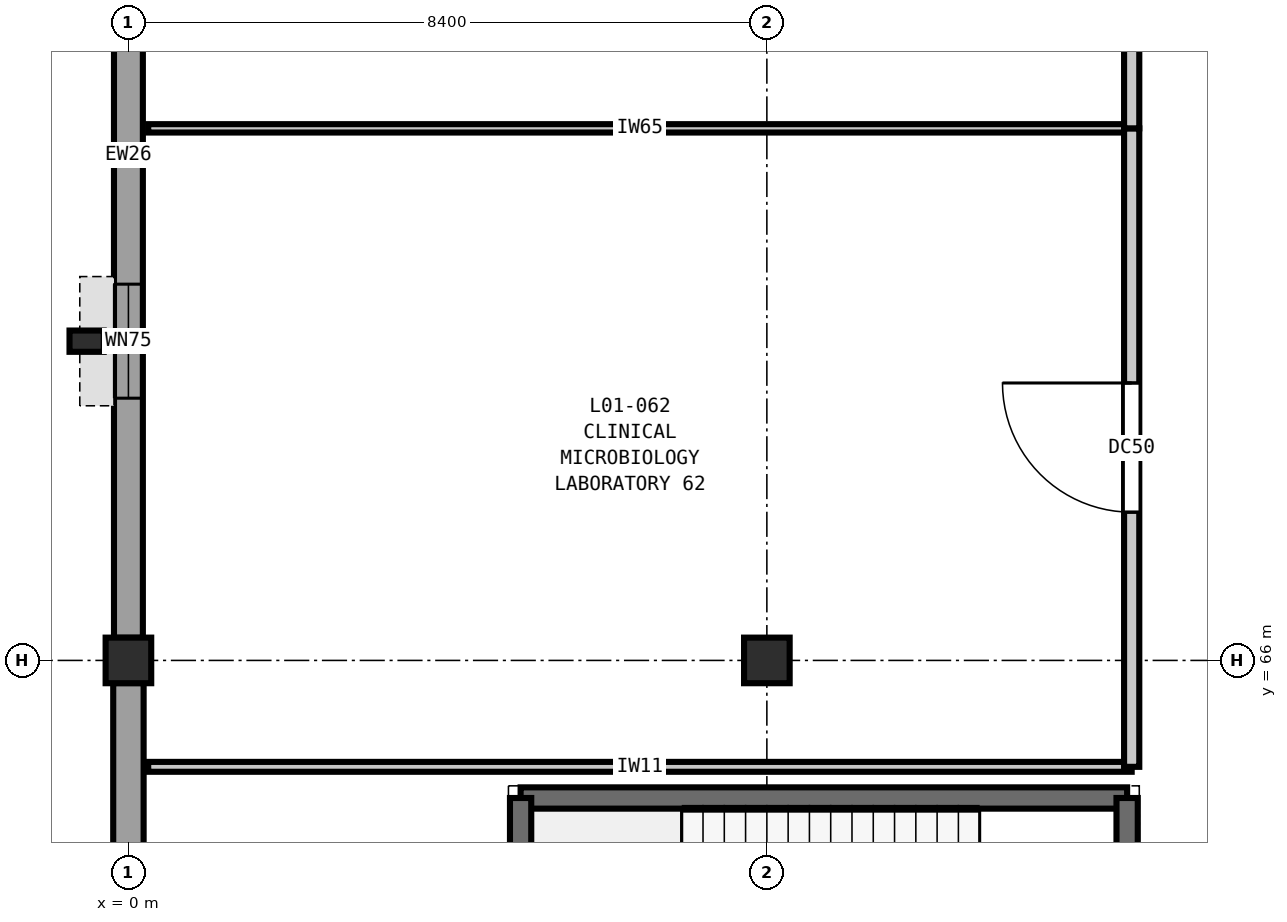
"""IFC4 building model, lengths in metres.
Left out: names, types, materials, properties, quantities, classifications, styles, units other than length and angle.
Written with IfcOpenShell. Run it as: python <this file> out.ifc"""

import sys

from ifc_helpers import new_model, si_unit, direction, frame, frame_2d, origin, origin_2d, place, context, subcontext, project, spatial, rectangle, extrude, element, fill, save


model = new_model("IFC4")
c1 = context("Model", 3, precision=1e-05, world=origin(), true_north=direction((0.0, 1.0)))
c2 = subcontext(c1, "Body", "Model", "MODEL_VIEW")
j1 = project(units=[si_unit("LENGTHUNIT", "METRE"), si_unit("PLANEANGLEUNIT", "RADIAN")], contexts=[c1])
p1 = place(None, origin())
s1 = spatial("IfcSite", under=j1, at=p1, CompositionType="ELEMENT")
p2 = place(p1, origin())
s2 = spatial("IfcBuilding", under=s1, at=p2, CompositionType="ELEMENT")
p3 = place(p2, frame((0.0, 0.0, 5.4)))
s3 = spatial("IfcBuildingStorey", under=s2, at=p3, CompositionType="ELEMENT", Elevation=5.4)
for number, where, z_axis, x_axis in (
    (1, (0.0, 66.0, 0.0), (0.0, 0.0, 1.0), (1.0, 0.0, 0.0)),
    (2, (8.4, 66.0, 0.0), (0.0, 0.0, 1.0), (1.0, 0.0, 0.0)),
):
    element("IfcColumn", number, at=place(p3, frame(where, z_axis=z_axis, x_axis=x_axis)), inside=s3, PredefinedType="COLUMN", context=c2, shape_type="SweptSolid", body=[
        extrude(rectangle(XDim=0.6, YDim=0.6, at=origin_2d()), origin(), (0.0, 0.0, 1.0), 5.4),
    ])
p4 = place(p3, frame((-0.55, 70.2, 0.0), z_axis=(0.0, 0.0, 1.0), x_axis=(1.0, 0.0, 0.0)))
e3 = element("IfcColumn", 3, at=p4, inside=s3, PredefinedType="PILASTER", context=c2, shape_type="SweptSolid", body=[
    extrude(rectangle(XDim=0.45, YDim=0.28, at=origin_2d()), origin(), (0.0, 0.0, 1.0), 5.4),
])
p5 = place(p3, frame((0.0, 57.898, 0.0), z_axis=(0.0, 0.0, 1.0), x_axis=(0.0, 1.0, 0.0)))
e4 = element("IfcWall", 4, at=p5, inside=s3, PredefinedType="SOLIDWALL", context=c2, shape_type="SweptSolid", body=[
    extrude(rectangle(XDim=7.804, YDim=0.4, at=frame_2d((3.902, 0.0))), origin(), (0.0, 0.0, 1.0), 4.68),
])
p6 = place(p5, frame((3.227, 0.0, 0.9)))
e5 = element("IfcOpeningElement", 5, at=p6, cuts=e4, PredefinedType="OPENING", context=c2, shape_type="SweptSolid", body=[
    extrude(rectangle(XDim=1.35, YDim=1.55, at=frame_2d((0.675, 0.775))), frame((0.0, 0.21, 0.0), z_axis=(0.0, -1.0, 0.0), x_axis=(1.0, 0.0, 0.0)), (0.0, 0.0, 1.0), 0.42),
])
p7 = place(p3, frame((0.0, 66.298, 0.0), z_axis=(0.0, 0.0, 1.0), x_axis=(0.0, 1.0, 0.0)))
e6 = element("IfcWall", 6, at=p7, inside=s3, PredefinedType="SOLIDWALL", context=c2, shape_type="SweptSolid", body=[
    extrude(rectangle(XDim=7.804, YDim=0.38, at=frame_2d((3.902, 0.0))), origin(), (0.0, 0.0, 1.0), 4.68),
])
p8 = place(p7, frame((3.152, 0.0, 0.9)))
e7 = element("IfcOpeningElement", 7, at=p8, cuts=e6, PredefinedType="OPENING", context=c2, shape_type="SweptSolid", body=[
    extrude(rectangle(XDim=1.5, YDim=1.55, at=frame_2d((0.75, 0.775))), frame((0.0, 0.2, 0.0), z_axis=(0.0, -1.0, 0.0), x_axis=(1.0, 0.0, 0.0)), (0.0, 0.0, 1.0), 0.4),
])
p9 = place(p3, frame((13.14, 64.19, 0.0), z_axis=(0.0, 0.0, 1.0), x_axis=(-1.0, 0.0, 0.0)))
e8 = element("IfcWall", 8, at=p9, inside=s3, PredefinedType="SHEAR", context=c2, shape_type="SweptSolid", body=[
    extrude(rectangle(XDim=7.98, YDim=0.28, at=frame_2d((3.99, 0.0))), origin(), (0.0, 0.0, 1.0), 5.4),
])
p10 = place(p3, frame((5.16, 64.19, 0.0), z_axis=(0.0, 0.0, 1.0), x_axis=(0.0, -1.0, 0.0)))
e9 = element("IfcWall", 9, at=p10, inside=s3, PredefinedType="SHEAR", context=c2, shape_type="SweptSolid", body=[
    extrude(rectangle(XDim=4.08, YDim=0.28, at=frame_2d((2.04, 0.0))), origin(), (0.0, 0.0, 1.0), 5.4),
])
p11 = place(p3, frame((13.14, 60.11, 0.0), z_axis=(0.0, 0.0, 1.0), x_axis=(0.0, 1.0, 0.0)))
e10 = element("IfcWall", 10, at=p11, inside=s3, PredefinedType="SHEAR", context=c2, shape_type="SweptSolid", body=[
    extrude(rectangle(XDim=4.08, YDim=0.28, at=frame_2d((2.04, 0.0))), origin(), (0.0, 0.0, 1.0), 5.4),
])
p12 = place(p11, frame((1.29, 0.0, 0.0)))
e11 = element("IfcOpeningElement", 11, at=p12, cuts=e10, PredefinedType="OPENING", context=c2, shape_type="SweptSolid", body=[
    extrude(rectangle(XDim=1.5, YDim=2.2, at=frame_2d((0.75, 1.1))), frame((0.0, 0.15, 0.0), z_axis=(0.0, -1.0, 0.0), x_axis=(1.0, 0.0, 0.0)), (0.0, 0.0, 1.0), 0.3),
])
p13 = place(p3, frame((0.26, 64.6, 0.0), z_axis=(0.0, 0.0, 1.0), x_axis=(1.0, 0.0, 0.0)))
e12 = element("IfcWall", 12, at=p13, inside=s3, PredefinedType="PARTITIONING", context=c2, shape_type="SweptSolid", body=[
    extrude(rectangle(XDim=12.94, YDim=0.13, at=frame_2d((6.47, 0.0))), origin(), (0.0, 0.0, 1.0), 5.05),
])
p14 = place(p3, frame((0.26, 73.0, 0.0), z_axis=(0.0, 0.0, 1.0), x_axis=(1.0, 0.0, 0.0)))
e13 = element("IfcWall", 13, at=p14, inside=s3, PredefinedType="PARTITIONING", context=c2, shape_type="SweptSolid", body=[
    extrude(rectangle(XDim=12.94, YDim=0.11, at=frame_2d((6.47, 0.0))), origin(), (0.0, 0.0, 1.0), 5.05),
])
p15 = place(p3, frame((13.2, 64.6, 0.0), z_axis=(0.0, 0.0, 1.0), x_axis=(0.0, 1.0, 0.0)))
e14 = element("IfcWall", 14, at=p15, inside=s3, PredefinedType="PARTITIONING", context=c2, shape_type="SweptSolid", body=[
    extrude(rectangle(XDim=8.4, YDim=0.2, at=frame_2d((4.2, 0.0))), origin(), (0.0, 0.0, 1.0), 5.05),
])
p16 = place(p15, frame((3.35, 0.0, 0.0)))
e15 = element("IfcOpeningElement", 15, at=p16, cuts=e14, PredefinedType="OPENING", context=c2, shape_type="SweptSolid", body=[
    extrude(rectangle(XDim=1.7, YDim=2.3, at=frame_2d((0.85, 1.15))), frame((0.0, 0.11, 0.0), z_axis=(0.0, -1.0, 0.0), x_axis=(1.0, 0.0, 0.0)), (0.0, 0.0, 1.0), 0.22),
])
p17 = place(p3, frame((13.2, 73.0, 0.0), z_axis=(0.0, 0.0, 1.0), x_axis=(0.0, 1.0, 0.0)))
e16 = element("IfcWall", 16, at=p17, inside=s3, PredefinedType="PARTITIONING", context=c2, shape_type="SweptSolid", body=[
    extrude(rectangle(XDim=9.8, YDim=0.2, at=frame_2d((4.9, 0.0))), origin(), (0.0, 0.0, 1.0), 5.05),
])
p18 = place(p17, frame((3.975, 0.0, 0.0)))
e17 = element("IfcOpeningElement", 17, at=p18, cuts=e16, PredefinedType="OPENING", context=c2, shape_type="SweptSolid", body=[
    extrude(rectangle(XDim=1.85, YDim=2.3, at=frame_2d((0.925, 1.15))), frame((0.0, 0.11, 0.0), z_axis=(0.0, -1.0, 0.0), x_axis=(1.0, 0.0, 0.0)), (0.0, 0.0, 1.0), 0.22),
])
p19 = place(p8, origin())
e18 = element("IfcWindow", 18, at=p19, inside=s3, PartitioningType="SINGLE_PANEL", PredefinedType="WINDOW", context=c2, shape_type="SweptSolid", body=[
    extrude(rectangle(XDim=1.5, YDim=1.55, at=frame_2d((0.75, 0.775))), frame((0.0, 0.03, 0.0), z_axis=(0.0, -1.0, 0.0), x_axis=(1.0, 0.0, 0.0)), (0.0, 0.0, 1.0), 0.06),
])
fill(e7, e18)
p20 = place(p16, origin())
e19 = element("IfcDoor", 19, at=p20, inside=s3, OperationType="SINGLE_SWING_RIGHT", PredefinedType="DOOR", context=c2, shape_type="SweptSolid", body=[
    extrude(rectangle(XDim=1.7, YDim=2.3, at=frame_2d((0.85, 1.15))), frame((0.0, 0.025, 0.0), z_axis=(0.0, -1.0, 0.0), x_axis=(1.0, 0.0, 0.0)), (0.0, 0.0, 1.0), 0.05),
])
fill(e15, e19)
save(model, sys.argv[1])
